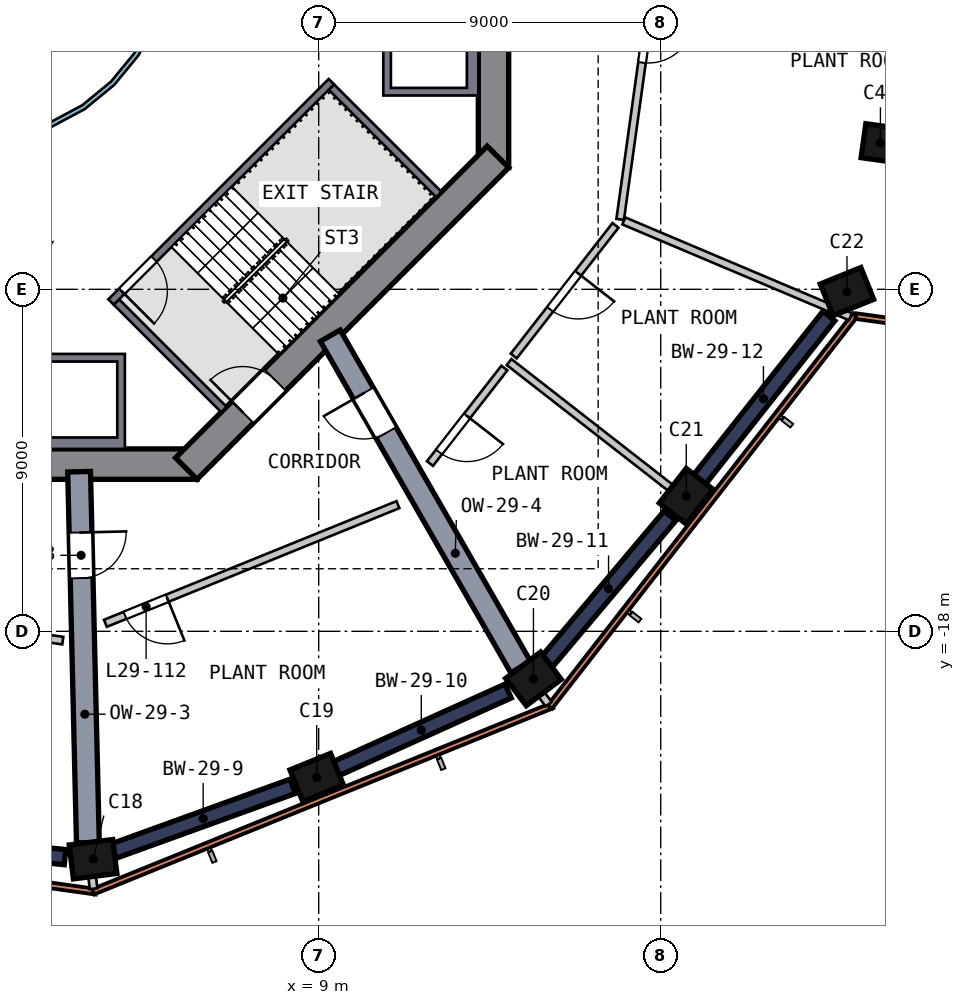
"""IFC4 building model, lengths in metres.
Left out: names, types, materials, properties, quantities, classifications, styles, units other than length and angle.
Written with IfcOpenShell. Run it as: python <this file> out.ifc"""

import sys

from ifc_helpers import new_model, si_unit, direction, frame, frame_2d, origin, origin_2d, place, context, subcontext, project, spatial, polyline, rectangle, outline, extrude, element, fill, save


model = new_model("IFC4")
c1 = context("Model", 3, precision=1e-05, world=origin(), true_north=direction((0.0, 1.0)))
c2 = subcontext(c1, "Body", "Model", "MODEL_VIEW")
j1 = project(units=[si_unit("LENGTHUNIT", "METRE"), si_unit("PLANEANGLEUNIT", "RADIAN")], contexts=[c1])
p1 = place(None, origin())
s1 = spatial("IfcSite", under=j1, at=p1, CompositionType="ELEMENT")
p2 = place(p1, origin())
s2 = spatial("IfcBuilding", under=s1, at=p2, CompositionType="ELEMENT")
p3 = place(p2, frame((0.0, 0.0, 122.0)))
s3 = spatial("IfcBuildingStorey", under=s2, at=p3, CompositionType="ELEMENT", Elevation=122.0)
p4 = place(p3, frame((2.982, -24.008, 0.0), z_axis=(0.066796618, 0.008877346, 0.997727119), x_axis=(-0.990102203, -0.123115196, 0.067381565)))
e1 = element("IfcColumn", 1, at=p4, inside=s3, PredefinedType="COLUMN", context=c2, shape_type="SweptSolid", body=[
    extrude(rectangle(XDim=1.15, YDim=0.9, at=origin_2d()), origin(), (0.0, 0.0, 1.0), 4.51),
])
p5 = place(p3, frame((8.875, -21.877, 0.0), z_axis=(0.060740591, 0.025227376, 0.997834736), x_axis=(0.924702521, 0.374966282, -0.0657688)))
e2 = element("IfcColumn", 2, at=p5, inside=s3, PredefinedType="COLUMN", context=c2, shape_type="SweptSolid", body=[
    extrude(rectangle(XDim=1.15, YDim=0.9, at=origin_2d()), origin(), (0.0, 0.0, 1.0), 4.51),
])
p6 = place(p3, frame((14.586, -19.301, 0.0), z_axis=(0.053426422, 0.041084756, 0.997726245), x_axis=(-0.796001802, -0.60153064, 0.067394506)))
e3 = element("IfcColumn", 3, at=p6, inside=s3, PredefinedType="COLUMN", context=c2, shape_type="SweptSolid", body=[
    extrude(rectangle(XDim=1.15, YDim=0.9, at=origin_2d()), origin(), (0.0, 0.0, 1.0), 4.51),
])
p7 = place(p3, frame((18.624, -14.509, 0.0), z_axis=(0.040006427, 0.052241139, 0.997832826), x_axis=(0.613325681, 0.787084661, -0.065797763)))
e4 = element("IfcColumn", 4, at=p7, inside=s3, PredefinedType="COLUMN", context=c2, shape_type="SweptSolid", body=[
    extrude(rectangle(XDim=1.15, YDim=0.9, at=origin_2d()), origin(), (0.0, 0.0, 1.0), 4.51),
])
p8 = place(p3, frame((22.871, -9.139, 0.0), z_axis=(0.024951811, 0.063976227, 0.997639439), x_axis=(-0.92655509, -0.373197896, 0.047106218)))
e5 = element("IfcColumn", 5, at=p8, inside=s3, PredefinedType="COLUMN", context=c2, shape_type="SweptSolid", body=[
    extrude(rectangle(XDim=1.15, YDim=0.9, at=origin_2d()), origin(), (0.0, 0.0, 1.0), 4.511),
])
p9 = place(p3, frame((23.764, -5.231, 0.0), z_axis=(0.013965223, 0.066307743, 0.997701486), x_axis=(0.990502818, -0.137410968, -0.004732058)))
e6 = element("IfcColumn", 6, at=p9, inside=s3, PredefinedType="COLUMN", context=c2, shape_type="SweptSolid", body=[
    extrude(rectangle(XDim=0.9, YDim=0.9, at=origin_2d()), origin(), (0.0, 0.0, 1.0), 4.51),
])
p10 = place(p3, frame((13.6, -5.799, 0.0), z_axis=(0.0, 0.0, 1.0), x_axis=(0.0, 1.0, 0.0)))
e7 = element("IfcWall", 7, at=p10, inside=s3, PredefinedType="SHEAR", context=c2, shape_type="SweptSolid", body=[
    extrude(rectangle(XDim=11.598, YDim=0.8, at=frame_2d((5.799, 0.0))), origin(), (0.0, 0.0, 1.0), 6.0),
])
p11 = place(p10, frame((4.899, 0.0, 0.0)))
e8 = element("IfcOpeningElement", 8, at=p11, cuts=e7, PredefinedType="OPENING", context=c2, shape_type="SweptSolid", body=[
    extrude(rectangle(XDim=1.8, YDim=2.1, at=frame_2d((0.9, 1.05))), frame((0.0, 0.41, 0.0), z_axis=(0.0, -1.0, 0.0), x_axis=(1.0, 0.0, 0.0)), (0.0, 0.0, 1.0), 0.82),
])
p12 = place(p3, frame((-5.799, -13.6, 0.0), z_axis=(0.0, 0.0, 1.0), x_axis=(1.0, 0.0, 0.0)))
e9 = element("IfcWall", 9, at=p12, inside=s3, PredefinedType="SHEAR", context=c2, shape_type="SweptSolid", body=[
    extrude(rectangle(XDim=11.598, YDim=0.8, at=frame_2d((5.799, 0.0))), origin(), (0.0, 0.0, 1.0), 6.0),
])
p13 = place(p12, frame((4.899, 0.0, 0.0)))
e10 = element("IfcOpeningElement", 10, at=p13, cuts=e9, PredefinedType="OPENING", context=c2, shape_type="SweptSolid", body=[
    extrude(rectangle(XDim=1.8, YDim=2.1, at=frame_2d((0.9, 1.05))), frame((0.0, 0.41, 0.0), z_axis=(0.0, -1.0, 0.0), x_axis=(1.0, 0.0, 0.0)), (0.0, 0.0, 1.0), 0.82),
])
p14 = place(p3, frame((5.516, -13.717, 0.0), z_axis=(0.0, 0.0, 1.0), x_axis=(0.707106781, 0.707106781, 0.0)))
e11 = element("IfcWall", 11, at=p14, inside=s3, PredefinedType="SHEAR", context=c2, shape_type="SweptSolid", body=[
    extrude(rectangle(XDim=11.598, YDim=0.8, at=frame_2d((5.799, 0.0))), origin(), (0.0, 0.0, 1.0), 6.0),
])
p15 = place(p14, frame((2.099, 0.0, 0.0)))
e12 = element("IfcOpeningElement", 12, at=p15, cuts=e11, PredefinedType="OPENING", context=c2, shape_type="SweptSolid", body=[
    extrude(rectangle(XDim=1.2, YDim=2.1, at=frame_2d((0.6, 1.05))), frame((0.0, 0.41, 0.0), z_axis=(0.0, -1.0, 0.0), x_axis=(1.0, 0.0, 0.0)), (0.0, 0.0, 1.0), 0.82),
])
p16 = place(p3, frame((-2.664, -23.442, 0.0), z_axis=(0.0, 0.0, 1.0), x_axis=(0.995010155, -0.099773701, 0.0)))
e13 = element("IfcWall", 13, at=p16, inside=s3, PredefinedType="SHEAR", context=c2, shape_type="SweptSolid", body=[
    extrude(rectangle(XDim=5.014, YDim=0.4, at=frame_2d((2.507, 0.0))), origin(), (0.0, 0.0, 1.0), 4.5),
])
p17 = place(p3, frame((3.603, -23.784, 0.0), z_axis=(0.0, 0.0, 1.0), x_axis=(0.940369267, 0.34015532, 0.0)))
e14 = element("IfcWall", 14, at=p17, inside=s3, PredefinedType="SHEAR", context=c2, shape_type="SweptSolid", body=[
    extrude(rectangle(XDim=5.014, YDim=0.4, at=frame_2d((2.507, 0.0))), origin(), (0.0, 0.0, 1.0), 4.5),
])
p18 = place(p3, frame((9.414, -21.634, 0.0), z_axis=(0.0, 0.0, 1.0), x_axis=(0.911583179, 0.411115687, 0.0)))
e15 = element("IfcWall", 15, at=p18, inside=s3, PredefinedType="SHEAR", context=c2, shape_type="SweptSolid", body=[
    extrude(rectangle(XDim=5.014, YDim=0.4, at=frame_2d((2.507, 0.0))), origin(), (0.0, 0.0, 1.0), 4.5),
])
p19 = place(p3, frame((15.012, -18.796, 0.0), z_axis=(0.0, 0.0, 1.0), x_axis=(0.644332147, 0.764745764, 0.0)))
e16 = element("IfcWall", 16, at=p19, inside=s3, PredefinedType="SHEAR", context=c2, shape_type="SweptSolid", body=[
    extrude(rectangle(XDim=5.014, YDim=0.4, at=frame_2d((2.507, 0.0))), origin(), (0.0, 0.0, 1.0), 4.5),
])
p20 = place(p3, frame((18.983, -14.055, 0.0), z_axis=(0.0, 0.0, 1.0), x_axis=(0.620299204, 0.784365284, 0.0)))
e17 = element("IfcWall", 17, at=p20, inside=s3, PredefinedType="SHEAR", context=c2, shape_type="SweptSolid", body=[
    extrude(rectangle(XDim=5.546, YDim=0.4, at=frame_2d((2.773, 0.0))), origin(), (0.0, 0.0, 1.0), 4.5),
])
p21 = place(p3, frame((2.695, -13.8, 0.0), z_axis=(0.0, 0.0, 1.0), x_axis=(0.023678425, -0.999719627, 0.0)))
e18 = element("IfcWall", 18, at=p21, inside=s3, PredefinedType="SHEAR", context=c2, shape_type="SweptSolid", body=[
    extrude(rectangle(XDim=9.764, YDim=0.6, at=frame_2d((4.882, 0.0))), origin(), (0.0, 0.0, 1.0), 4.5),
])
p22 = place(p21, frame((1.6, 0.0, 0.0)))
e19 = element("IfcOpeningElement", 19, at=p22, cuts=e18, PredefinedType="OPENING", context=c2, shape_type="SweptSolid", body=[
    extrude(rectangle(XDim=1.2, YDim=2.1, at=frame_2d((0.6, 1.05))), frame((0.0, 0.31, 0.0), z_axis=(0.0, -1.0, 0.0), x_axis=(1.0, 0.0, 0.0)), (0.0, 0.0, 1.0), 0.62),
])
p23 = place(p3, frame((9.305, -10.221, 0.0), z_axis=(0.0, 0.0, 1.0), x_axis=(0.498160963, -0.867084572, 0.0)))
e20 = element("IfcWall", 20, at=p23, inside=s3, PredefinedType="SHEAR", context=c2, shape_type="SweptSolid", body=[
    extrude(rectangle(XDim=10.058, YDim=0.6, at=frame_2d((5.029, 0.0))), origin(), (0.0, 0.0, 1.0), 4.5),
])
p24 = place(p23, frame((1.75, 0.0, 0.0)))
e21 = element("IfcOpeningElement", 21, at=p24, cuts=e20, PredefinedType="OPENING", context=c2, shape_type="SweptSolid", body=[
    extrude(rectangle(XDim=1.2, YDim=2.1, at=frame_2d((0.6, 1.05))), frame((0.0, 0.31, 0.0), z_axis=(0.0, -1.0, 0.0), x_axis=(1.0, 0.0, 0.0)), (0.0, 0.0, 1.0), 0.62),
])
p25 = place(p3, frame((-9.782, -23.055, 0.0), z_axis=(0.0, 0.0, 1.0), x_axis=(0.990461934, -0.137786639, 0.0)))
e22 = element("IfcWall", 22, at=p25, inside=s3, PredefinedType="SOLIDWALL", context=c2, shape_type="SweptSolid", body=[
    extrude(rectangle(XDim=13.046, YDim=0.15, at=frame_2d((6.523, 0.0))), origin(), (0.0, 0.0, 1.0), 4.5),
])
p26 = place(p3, frame((3.067, -24.853, 0.0), z_axis=(0.0, 0.0, 1.0), x_axis=(0.926663813, 0.375891179, 0.0)))
e23 = element("IfcWall", 23, at=p26, inside=s3, PredefinedType="SOLIDWALL", context=c2, shape_type="SweptSolid", body=[
    extrude(rectangle(XDim=13.035, YDim=0.15, at=frame_2d((6.517, 0.0))), origin(), (0.0, 0.0, 1.0), 4.5),
])
p27 = place(p3, frame((15.083, -19.99, 0.0), z_axis=(0.0, 0.0, 1.0), x_axis=(0.614562211, 0.788868359, 0.0)))
e24 = element("IfcWall", 24, at=p27, inside=s3, PredefinedType="SOLIDWALL", context=c2, shape_type="SweptSolid", body=[
    extrude(rectangle(XDim=13.075, YDim=0.15, at=frame_2d((6.538, 0.0))), origin(), (0.0, 0.0, 1.0), 4.5),
])
p28 = place(p3, frame((23.13, -9.705, 0.0), z_axis=(0.0, 0.0, 1.0), x_axis=(0.990452366, -0.137855397, 0.0)))
e25 = element("IfcWall", 25, at=p28, inside=s3, PredefinedType="SOLIDWALL", context=c2, shape_type="SweptSolid", body=[
    extrude(rectangle(XDim=1.831, YDim=0.15, at=frame_2d((0.916, 0.0))), origin(), (0.0, 0.0, 1.0), 4.5),
])
p29 = place(p3, origin())
e26 = element("IfcWall", 26, at=p29, inside=s3, PredefinedType="SOLIDWALL", context=c2, shape_type="SweptSolid", body=[
    extrude(outline(polyline([(13.2, -1.2), (13.2, -3.9), (10.7, -3.9), (10.7, -1.2), (13.2, -1.2)]), holes=[polyline([(10.9, -3.7), (12.9, -3.7), (12.9, -1.4), (10.9, -1.4), (10.9, -3.7)])]), origin(), (0.0, 0.0, 1.0), 5.55),
])
p30 = place(p3, origin())
e27 = element("IfcWall", 27, at=p30, inside=s3, PredefinedType="SOLIDWALL", context=c2, shape_type="SweptSolid", body=[
    extrude(outline(polyline([(3.9, -10.7), (3.9, -13.2), (1.2, -13.2), (1.2, -10.7), (3.9, -10.7)]), holes=[polyline([(1.4, -12.9), (3.7, -12.9), (3.7, -10.9), (1.4, -10.9), (1.4, -12.9)])]), origin(), (0.0, 0.0, 1.0), 5.55),
])
p31 = place(p3, frame((9.334, -3.535, 0.0), z_axis=(0.0, 0.0, 1.0), x_axis=(-0.707106781, -0.707106781, 0.0)))
e28 = element("IfcWall", 28, at=p31, inside=s3, PredefinedType="SOLIDWALL", context=c2, shape_type="SweptSolid", body=[
    extrude(rectangle(XDim=8.2, YDim=0.2, at=frame_2d((4.1, 0.0))), origin(), (0.0, 0.0, 1.0), 5.55),
])
p32 = place(p31, frame((6.6, 0.0, 0.0)))
e29 = element("IfcOpeningElement", 29, at=p32, cuts=e28, PredefinedType="OPENING", context=c2, shape_type="SweptSolid", body=[
    extrude(rectangle(XDim=1.2, YDim=2.1, at=frame_2d((0.6, 1.05))), frame((0.0, 0.11, 0.0), z_axis=(0.0, -1.0, 0.0), x_axis=(1.0, 0.0, 0.0)), (0.0, 0.0, 1.0), 0.22),
])
for number, where, z_axis, x_axis in (
    (30, (3.677, -9.334, 0.0), (0.0, 0.0, 1.0), (0.707, -0.707, 0.0)),
    (31, (9.334, -3.677, 0.0), (0.0, 0.0, 1.0), (0.707, -0.707, 0.0)),
):
    element("IfcWall", number, at=place(p3, frame(where, z_axis=z_axis, x_axis=x_axis)), inside=s3, PredefinedType="SOLIDWALL", context=c2, shape_type="SweptSolid", body=[
        extrude(rectangle(XDim=4.0, YDim=0.2, at=frame_2d((2.0, 0.0))), origin(), (0.0, 0.0, 1.0), 5.55),
    ])
p33 = place(p3, origin())
e32 = element("IfcWall", 32, at=p33, inside=s3, PredefinedType="SOLIDWALL", context=c2, shape_type="SweptSolid", body=[
    extrude(outline(polyline([(5.021, -0.999), (4.73, -1.959), (4.257, -2.844), (3.62, -3.62), (2.844, -4.257), (1.959, -4.73), (0.999, -5.021), (0.0, -5.12), (-0.999, -5.021), (-1.959, -4.73), (-2.844, -4.257), (-3.62, -3.62), (-4.257, -2.844), (-4.73, -1.959), (-5.021, -0.999), (-5.12, 0.0), (-5.021, 0.999), (-4.73, 1.959), (-4.257, 2.844), (-3.62, 3.62), (-2.844, 4.257), (-1.959, 4.73), (-0.999, 5.021), (0.0, 5.12), (0.999, 5.021), (1.959, 4.73), (2.844, 4.257), (3.62, 3.62), (4.257, 2.844), (4.73, 1.959), (5.021, 0.999), (5.12, 0.0), (5.021, -0.999)]), holes=[polyline([(4.904, 0.976), (4.619, 1.913), (4.157, 2.778), (3.535, 3.535), (2.778, 4.157), (1.913, 4.619), (0.976, 4.904), (0.0, 5.0), (-0.976, 4.904), (-1.913, 4.619), (-2.778, 4.157), (-3.535, 3.535), (-4.157, 2.778), (-4.619, 1.913), (-4.904, 0.976), (-5.0, 0.0), (-4.904, -0.976), (-4.619, -1.913), (-4.157, -2.778), (-3.535, -3.535), (-2.778, -4.157), (-1.913, -4.619), (-0.976, -4.904), (0.0, -5.0), (0.976, -4.904), (1.913, -4.619), (2.778, -4.157), (3.535, -3.535), (4.157, -2.778), (4.619, -1.913), (4.904, -0.976), (5.0, 0.0), (4.904, 0.976)])]), origin(), (0.0, 0.0, 1.0), 5.55),
])
p34 = place(p3, frame((2.266, -18.245, 0.0), z_axis=(0.0, 0.0, 1.0), x_axis=(-0.990462051, 0.137785793, 0.0)))
e33 = element("IfcWall", 33, at=p34, inside=s3, PredefinedType="SOLIDWALL", context=c2, shape_type="SweptSolid", body=[
    extrude(rectangle(XDim=9.517, YDim=0.2, at=frame_2d((4.758, 0.0))), origin(), (0.0, 0.0, 1.0), 4.5),
])
p35 = place(p34, frame((6.55, 0.0, 0.0)))
e34 = element("IfcOpeningElement", 34, at=p35, cuts=e33, PredefinedType="OPENING", context=c2, shape_type="SweptSolid", body=[
    extrude(rectangle(XDim=1.2, YDim=2.1, at=frame_2d((0.6, 1.05))), frame((0.0, 0.11, 0.0), z_axis=(0.0, -1.0, 0.0), x_axis=(1.0, 0.0, 0.0)), (0.0, 0.0, 1.0), 0.22),
])
p36 = place(p3, frame((2.932, -23.607, 0.0), z_axis=(0.0, 0.0, 1.0), x_axis=(0.123344665, -0.992363892, 0.0)))
e35 = element("IfcWall", 35, at=p36, inside=s3, PredefinedType="SOLIDWALL", context=c2, shape_type="SweptSolid", body=[
    extrude(rectangle(XDim=1.176, YDim=0.2, at=frame_2d((0.588, 0.0))), origin(), (0.0, 0.0, 1.0), 4.5),
])
p37 = place(p3, frame((11.085, -14.667, 0.0), z_axis=(0.0, 0.0, 1.0), x_axis=(-0.926665674, -0.37588659, 0.0)))
e36 = element("IfcWall", 36, at=p37, inside=s3, PredefinedType="SOLIDWALL", context=c2, shape_type="SweptSolid", body=[
    extrude(rectangle(XDim=8.306, YDim=0.2, at=frame_2d((4.153, 0.0))), origin(), (0.0, 0.0, 1.0), 4.5),
])
p38 = place(p37, frame((6.55, 0.0, 0.0)))
e37 = element("IfcOpeningElement", 37, at=p38, cuts=e36, PredefinedType="OPENING", context=c2, shape_type="SweptSolid", body=[
    extrude(rectangle(XDim=1.2, YDim=2.1, at=frame_2d((0.6, 1.05))), frame((0.0, 0.11, 0.0), z_axis=(0.0, -1.0, 0.0), x_axis=(1.0, 0.0, 0.0)), (0.0, 0.0, 1.0), 0.22),
])
p39 = place(p3, frame((13.886, -11.071, 0.0), z_axis=(0.0, 0.0, 1.0), x_axis=(-0.614571572, -0.788861067, 0.0)))
e38 = element("IfcWall", 38, at=p39, inside=s3, PredefinedType="SOLIDWALL", context=c2, shape_type="SweptSolid", body=[
    extrude(rectangle(XDim=3.187, YDim=0.2, at=frame_2d((1.593, 0.0))), origin(), (0.0, 0.0, 1.0), 4.5),
])
p40 = place(p39, frame((1.6, 0.0, 0.0)))
e39 = element("IfcOpeningElement", 39, at=p40, cuts=e38, PredefinedType="OPENING", context=c2, shape_type="SweptSolid", body=[
    extrude(rectangle(XDim=1.2, YDim=2.1, at=frame_2d((0.6, 1.05))), frame((0.0, 0.11, 0.0), z_axis=(0.0, -1.0, 0.0), x_axis=(1.0, 0.0, 0.0)), (0.0, 0.0, 1.0), 0.22),
])
p41 = place(p3, frame((14.343, -18.978, 0.0), z_axis=(0.0, 0.0, 1.0), x_axis=(0.602853653, -0.797851786, 0.0)))
e40 = element("IfcWall", 40, at=p41, inside=s3, PredefinedType="SOLIDWALL", context=c2, shape_type="SweptSolid", body=[
    extrude(rectangle(XDim=1.176, YDim=0.2, at=frame_2d((0.588, 0.0))), origin(), (0.0, 0.0, 1.0), 4.5),
])
p42 = place(p3, frame((16.81, -7.318, 0.0), z_axis=(0.0, 0.0, 1.0), x_axis=(-0.614553159, -0.788875411, 0.0)))
e41 = element("IfcWall", 41, at=p42, inside=s3, PredefinedType="SOLIDWALL", context=c2, shape_type="SweptSolid", body=[
    extrude(rectangle(XDim=4.358, YDim=0.2, at=frame_2d((2.179, 0.0))), origin(), (0.0, 0.0, 1.0), 4.5),
])
p43 = place(p42, frame((1.6, 0.0, 0.0)))
e42 = element("IfcOpeningElement", 42, at=p43, cuts=e41, PredefinedType="OPENING", context=c2, shape_type="SweptSolid", body=[
    extrude(rectangle(XDim=1.2, YDim=2.1, at=frame_2d((0.6, 1.05))), frame((0.0, 0.11, 0.0), z_axis=(0.0, -1.0, 0.0), x_axis=(1.0, 0.0, 0.0)), (0.0, 0.0, 1.0), 0.22),
])
p44 = place(p3, frame((14.009, -10.914, 0.0), z_axis=(0.0, 0.0, 1.0), x_axis=(0.788875816, -0.614552639, 0.0)))
e43 = element("IfcWall", 43, at=p44, inside=s3, PredefinedType="SOLIDWALL", context=c2, shape_type="SweptSolid", body=[
    extrude(rectangle(XDim=6.35, YDim=0.2, at=frame_2d((3.175, 0.0))), origin(), (0.0, 0.0, 1.0), 4.5),
])
p45 = place(p3, frame((18.217, 2.068, 0.0), z_axis=(0.0, 0.0, 1.0), x_axis=(-0.137784751, -0.990462196, 0.0)))
e44 = element("IfcWall", 44, at=p45, inside=s3, PredefinedType="SOLIDWALL", context=c2, shape_type="SweptSolid", body=[
    extrude(rectangle(XDim=9.317, YDim=0.2, at=frame_2d((4.658, 0.0))), origin(), (0.0, 0.0, 1.0), 4.5),
])
p46 = place(p45, frame((3.95, 0.0, 0.0)))
e45 = element("IfcOpeningElement", 45, at=p46, cuts=e44, PredefinedType="OPENING", context=c2, shape_type="SweptSolid", body=[
    extrude(rectangle(XDim=1.2, YDim=2.1, at=frame_2d((0.6, 1.05))), frame((0.0, 0.11, 0.0), z_axis=(0.0, -1.0, 0.0), x_axis=(1.0, 0.0, 0.0)), (0.0, 0.0, 1.0), 0.22),
])
p47 = place(p3, frame((17.029, -7.2, 0.0), z_axis=(0.0, 0.0, 1.0), x_axis=(0.921045284, -0.389455497, 0.0)))
e46 = element("IfcWall", 46, at=p47, inside=s3, PredefinedType="SOLIDWALL", context=c2, shape_type="SweptSolid", body=[
    extrude(rectangle(XDim=6.476, YDim=0.2, at=frame_2d((3.238, 0.0))), origin(), (0.0, 0.0, 1.0), 4.5),
])
p48 = place(p32, origin())
e47 = element("IfcDoor", 47, at=p48, inside=s3, OperationType="SINGLE_SWING_RIGHT", PredefinedType="DOOR", context=c2, shape_type="SweptSolid", body=[
    extrude(rectangle(XDim=1.2, YDim=2.1, at=frame_2d((0.6, 1.05))), frame((0.0, 0.025, 0.0), z_axis=(0.0, -1.0, 0.0), x_axis=(1.0, 0.0, 0.0)), (0.0, 0.0, 1.0), 0.05),
])
fill(e29, e47)
p49 = place(p15, origin())
e48 = element("IfcDoor", 48, at=p49, inside=s3, OperationType="SINGLE_SWING_LEFT", PredefinedType="DOOR", context=c2, shape_type="SweptSolid", body=[
    extrude(rectangle(XDim=1.2, YDim=2.1, at=frame_2d((0.6, 1.05))), frame((0.0, 0.025, 0.0), z_axis=(0.0, -1.0, 0.0), x_axis=(1.0, 0.0, 0.0)), (0.0, 0.0, 1.0), 0.05),
])
fill(e12, e48)
p50 = place(p22, origin())
e49 = element("IfcDoor", 49, at=p50, inside=s3, OperationType="SINGLE_SWING_LEFT", PredefinedType="DOOR", context=c2, shape_type="SweptSolid", body=[
    extrude(rectangle(XDim=1.2, YDim=2.1, at=frame_2d((0.6, 1.05))), frame((0.0, 0.025, 0.0), z_axis=(0.0, -1.0, 0.0), x_axis=(1.0, 0.0, 0.0)), (0.0, 0.0, 1.0), 0.05),
])
fill(e19, e49)
p51 = place(p24, origin())
e50 = element("IfcDoor", 50, at=p51, inside=s3, OperationType="SINGLE_SWING_LEFT", PredefinedType="DOOR", context=c2, shape_type="SweptSolid", body=[
    extrude(rectangle(XDim=1.2, YDim=2.1, at=frame_2d((0.6, 1.05))), frame((0.0, 0.025, 0.0), z_axis=(0.0, -1.0, 0.0), x_axis=(1.0, 0.0, 0.0)), (0.0, 0.0, 1.0), 0.05),
])
fill(e21, e50)
p52 = place(p38, origin())
e51 = element("IfcDoor", 51, at=p52, inside=s3, OperationType="SINGLE_SWING_LEFT", PredefinedType="DOOR", context=c2, shape_type="SweptSolid", body=[
    extrude(rectangle(XDim=1.2, YDim=2.1, at=frame_2d((0.6, 1.05))), frame((0.0, 0.025, 0.0), z_axis=(0.0, -1.0, 0.0), x_axis=(1.0, 0.0, 0.0)), (0.0, 0.0, 1.0), 0.05),
])
fill(e37, e51)
p53 = place(p40, origin())
e52 = element("IfcDoor", 52, at=p53, inside=s3, OperationType="SINGLE_SWING_LEFT", PredefinedType="DOOR", context=c2, shape_type="SweptSolid", body=[
    extrude(rectangle(XDim=1.2, YDim=2.1, at=frame_2d((0.6, 1.05))), frame((0.0, 0.025, 0.0), z_axis=(0.0, -1.0, 0.0), x_axis=(1.0, 0.0, 0.0)), (0.0, 0.0, 1.0), 0.05),
])
fill(e39, e52)
p54 = place(p43, origin())
e53 = element("IfcDoor", 53, at=p54, inside=s3, OperationType="SINGLE_SWING_LEFT", PredefinedType="DOOR", context=c2, shape_type="SweptSolid", body=[
    extrude(rectangle(XDim=1.2, YDim=2.1, at=frame_2d((0.6, 1.05))), frame((0.0, 0.025, 0.0), z_axis=(0.0, -1.0, 0.0), x_axis=(1.0, 0.0, 0.0)), (0.0, 0.0, 1.0), 0.05),
])
fill(e42, e53)
p55 = place(p46, origin())
e54 = element("IfcDoor", 54, at=p55, inside=s3, OperationType="SINGLE_SWING_LEFT", PredefinedType="DOOR", context=c2, shape_type="SweptSolid", body=[
    extrude(rectangle(XDim=1.2, YDim=2.1, at=frame_2d((0.6, 1.05))), frame((0.0, 0.025, 0.0), z_axis=(0.0, -1.0, 0.0), x_axis=(1.0, 0.0, 0.0)), (0.0, 0.0, 1.0), 0.05),
])
fill(e45, e54)
save(model, sys.argv[1])
